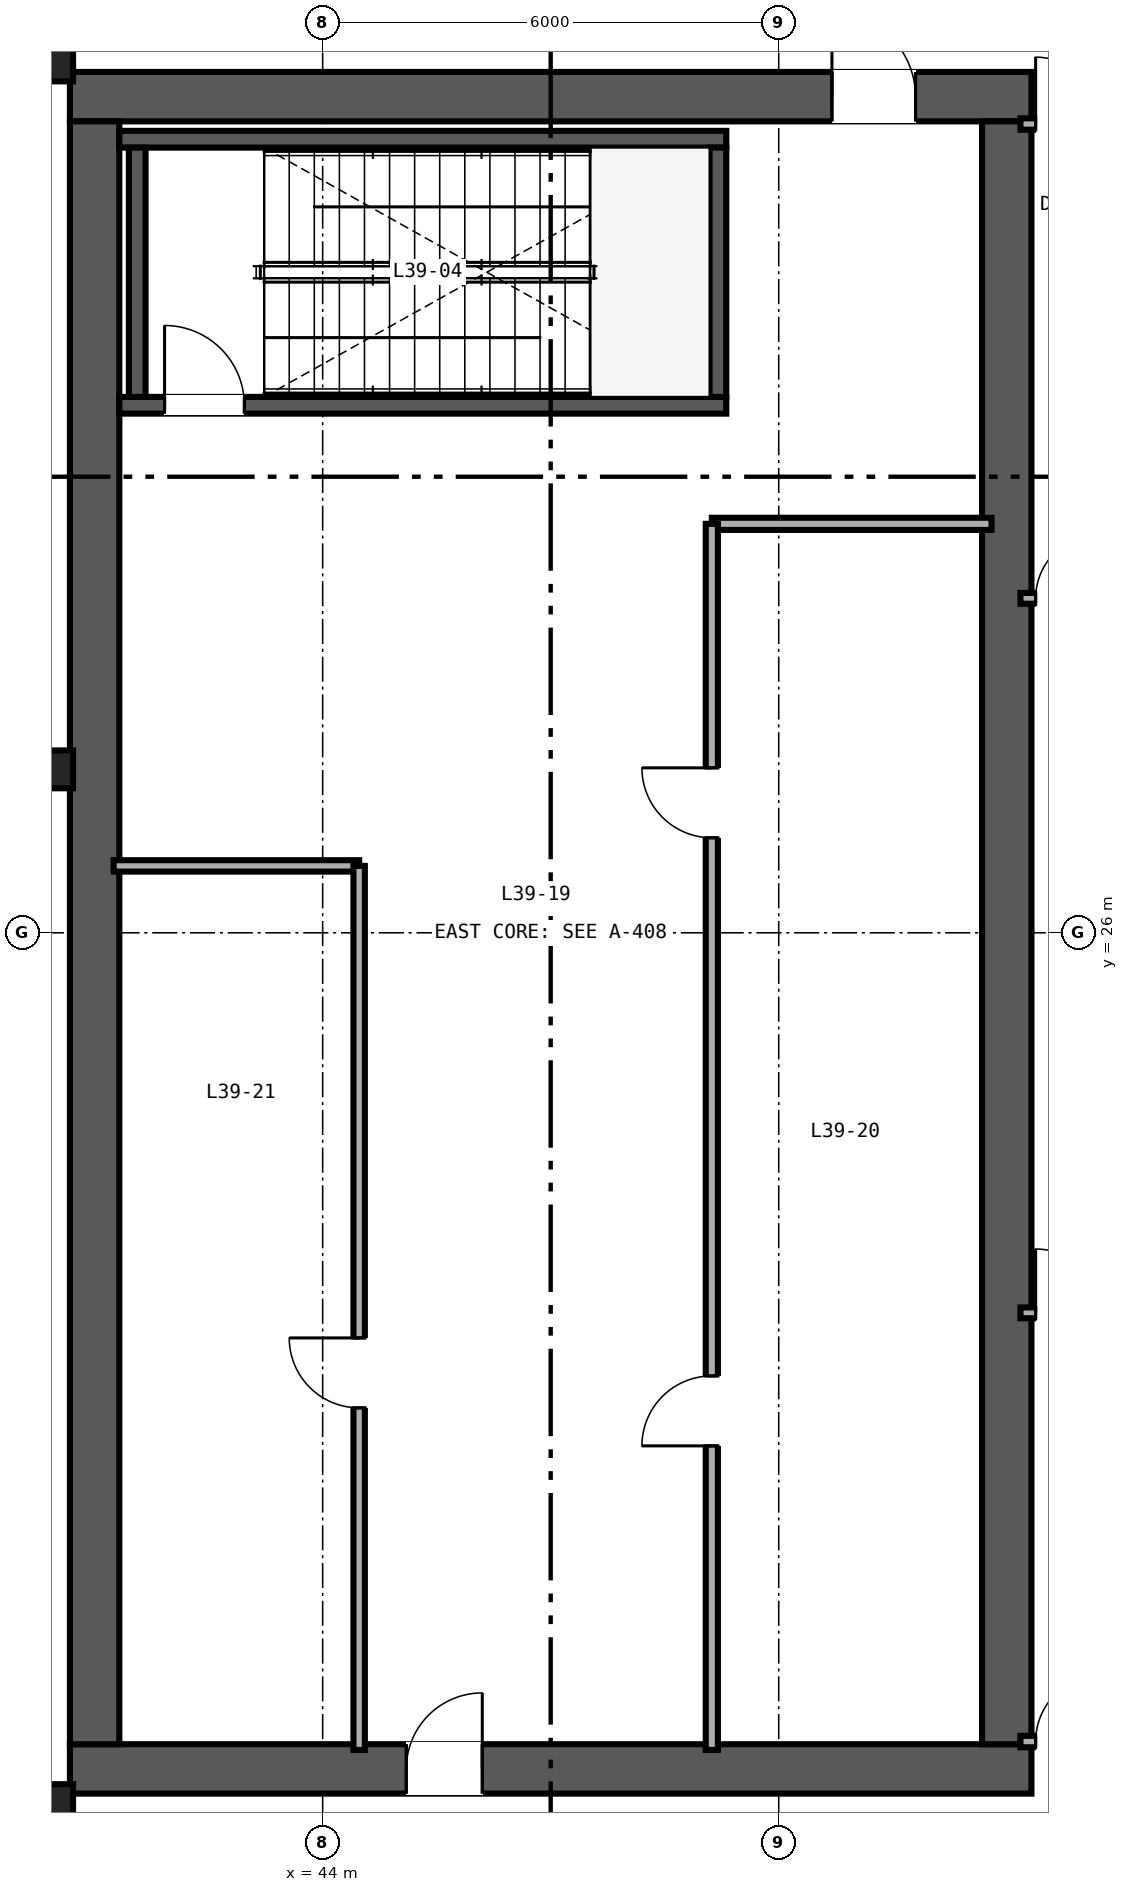
"""IFC4 building model, lengths in metres.
Left out: names, types, materials, properties, quantities, classifications, styles, units other than length and angle.
Written with IfcOpenShell. Run it as: python <this file> out.ifc"""

import sys

from ifc_helpers import new_model, si_unit, direction, frame, frame_2d, origin, origin_2d, place, context, subcontext, project, spatial, rectangle, i_section, extrude, source, transform, mapped, element, fill, save


model = new_model("IFC4")
c1 = context("Model", 3, precision=1e-05, world=origin(), true_north=direction((0.0, 1.0)))
c2 = subcontext(c1, "Body", "Model", "MODEL_VIEW")
j1 = project(units=[si_unit("LENGTHUNIT", "METRE"), si_unit("PLANEANGLEUNIT", "RADIAN")], contexts=[c1])
p1 = place(None, origin())
s1 = spatial("IfcSite", under=j1, at=p1, CompositionType="ELEMENT")
p2 = place(p1, origin())
s2 = spatial("IfcBuilding", under=s1, at=p2, CompositionType="ELEMENT")
p3 = place(p2, frame((0.0, 0.0, 158.4)))
s3 = spatial("IfcBuildingStorey", under=s2, at=p3, CompositionType="ELEMENT", Elevation=158.4)
p4 = place(p3, frame((40.675, 15.0, 0.0), z_axis=(0.0, 0.0, 1.0), x_axis=(1.0, 0.0, 0.0)))
e1 = element("IfcWall", 1, at=p4, inside=s3, PredefinedType="SHEAR", context=c2, shape_type="SweptSolid", body=[
    extrude(rectangle(XDim=12.65, YDim=0.65, at=frame_2d((6.325, 0.0))), origin(), (0.0, 0.0, 1.0), 4.57),
])
p5 = place(p4, frame((4.425, 0.0, 0.0)))
e2 = element("IfcOpeningElement", 2, at=p5, cuts=e1, PredefinedType="OPENING", context=c2, shape_type="SweptSolid", body=[
    extrude(rectangle(XDim=1.0, YDim=2.15, at=frame_2d((0.5, 1.075))), frame((0.0, 0.335, 0.0), z_axis=(0.0, -1.0, 0.0), x_axis=(1.0, 0.0, 0.0)), (0.0, 0.0, 1.0), 0.67),
])
p6 = place(p3, frame((40.675, 37.0, 0.0), z_axis=(0.0, 0.0, 1.0), x_axis=(1.0, 0.0, 0.0)))
e3 = element("IfcWall", 3, at=p6, inside=s3, PredefinedType="SHEAR", context=c2, shape_type="SweptSolid", body=[
    extrude(rectangle(XDim=12.65, YDim=0.65, at=frame_2d((6.325, 0.0))), origin(), (0.0, 0.0, 1.0), 4.57),
])
p7 = place(p6, frame((10.025, 0.0, 0.0)))
e4 = element("IfcOpeningElement", 4, at=p7, cuts=e3, PredefinedType="OPENING", context=c2, shape_type="SweptSolid", body=[
    extrude(rectangle(XDim=1.1, YDim=2.15, at=frame_2d((0.55, 1.075))), frame((0.0, 0.335, 0.0), z_axis=(0.0, -1.0, 0.0), x_axis=(1.0, 0.0, 0.0)), (0.0, 0.0, 1.0), 0.67),
])
for number, where, z_axis, x_axis in (
    (5, (41.0, 15.325, 0.0), (0.0, 0.0, 1.0), (0.0, 1.0, 0.0)),
    (6, (53.0, 15.325, 0.0), (0.0, 0.0, 1.0), (0.0, 1.0, 0.0)),
):
    element("IfcWall", number, at=place(p3, frame(where, z_axis=z_axis, x_axis=x_axis)), inside=s3, PredefinedType="SHEAR", context=c2, shape_type="SweptSolid", body=[
        extrude(rectangle(XDim=21.35, YDim=0.65, at=frame_2d((10.675, 0.0))), origin(), (0.0, 0.0, 1.0), 4.57),
    ])
p8 = place(p3, frame((41.325, 32.94, 0.0), z_axis=(0.0, 0.0, 1.0), x_axis=(1.0, 0.0, 0.0)))
e7 = element("IfcWall", 7, at=p8, inside=s3, PredefinedType="SHEAR", context=c2, shape_type="SweptSolid", body=[
    extrude(rectangle(XDim=7.985, YDim=0.22, at=frame_2d((3.993, 0.0))), origin(), (0.0, 0.0, 1.0), 4.6),
])
p9 = place(p8, frame((0.595, 0.0, 0.0)))
e8 = element("IfcOpeningElement", 8, at=p9, cuts=e7, PredefinedType="OPENING", context=c2, shape_type="SweptSolid", body=[
    extrude(rectangle(XDim=1.05, YDim=2.15, at=frame_2d((0.525, 1.075))), frame((0.0, 0.12, 0.0), z_axis=(0.0, -1.0, 0.0), x_axis=(1.0, 0.0, 0.0)), (0.0, 0.0, 1.0), 0.24),
])
p10 = place(p3, frame((41.325, 36.44, 0.0), z_axis=(0.0, 0.0, 1.0), x_axis=(1.0, 0.0, 0.0)))
e9 = element("IfcWall", 9, at=p10, inside=s3, PredefinedType="SHEAR", context=c2, shape_type="SweptSolid", body=[
    extrude(rectangle(XDim=7.985, YDim=0.22, at=frame_2d((3.993, 0.0))), origin(), (0.0, 0.0, 1.0), 4.6),
])
for number, where, z_axis, x_axis in (
    (10, (41.56, 33.05, 0.0), (0.0, 0.0, 1.0), (0.0, 1.0, 0.0)),
    (11, (49.2, 33.05, 0.0), (0.0, 0.0, 1.0), (0.0, 1.0, 0.0)),
):
    element("IfcWall", number, at=place(p3, frame(where, z_axis=z_axis, x_axis=x_axis)), inside=s3, PredefinedType="SHEAR", context=c2, shape_type="SweptSolid", body=[
        extrude(rectangle(XDim=3.28, YDim=0.22, at=frame_2d((1.64, 0.0))), origin(), (0.0, 0.0, 1.0), 4.6),
    ])
m1 = source(origin(), c2, "Body", "SweptSolid", [
    extrude(i_section(OverallWidth=0.432, OverallDepth=0.498, WebThickness=0.056, FlangeThickness=0.089, FilletRadius=0.025, at=origin_2d()), origin(), (0.0, 0.0, 1.0), 4.57),
])
for number, where, z_axis, x_axis in (
    (12, (40.5, 14.55, 0.0), (0.0, 0.0, 1.0), (1.0, 0.0, 0.0)),
    (13, (40.5, 28.15, 0.0), (0.0, 0.0, 1.0), (1.0, 0.0, 0.0)),
    (14, (40.5, 37.45, 0.0), (0.0, 0.0, 1.0), (1.0, 0.0, 0.0)),
):
    element("IfcColumn", number, at=place(p3, frame(where, z_axis=z_axis, x_axis=x_axis)), inside=s3, PredefinedType="COLUMN", context=c2, shape_type="MappedRepresentation", body=[
        mapped(m1, transform((0.0, 0.0, 0.0), scale=1.0)),
    ])
p11 = place(p3, frame((49.12, 31.38, 0.0), z_axis=(0.0, 0.0, 1.0), x_axis=(1.0, 0.0, 0.0)))
e15 = element("IfcWall", 15, at=p11, inside=s3, PredefinedType="PARTITIONING", context=c2, shape_type="SweptSolid", body=[
    extrude(rectangle(XDim=3.68, YDim=0.16, at=frame_2d((1.84, 0.0))), origin(), (0.0, 0.0, 1.0), 3.47),
])
p12 = place(p3, frame((49.12, 15.25, 0.0), z_axis=(0.0, 0.0, 1.0), x_axis=(0.0, 1.0, 0.0)))
e16 = element("IfcWall", 16, at=p12, inside=s3, PredefinedType="PARTITIONING", context=c2, shape_type="SweptSolid", body=[
    extrude(rectangle(XDim=16.13, YDim=0.16, at=frame_2d((8.065, 0.0))), origin(), (0.0, 0.0, 1.0), 3.47),
])
p13 = place(p12, frame((4.0, 0.0, 0.0)))
e17 = element("IfcOpeningElement", 17, at=p13, cuts=e16, PredefinedType="OPENING", context=c2, shape_type="SweptSolid", body=[
    extrude(rectangle(XDim=0.92, YDim=2.15, at=frame_2d((0.46, 1.075))), frame((0.0, 0.09, 0.0), z_axis=(0.0, -1.0, 0.0), x_axis=(1.0, 0.0, 0.0)), (0.0, 0.0, 1.0), 0.18),
])
p14 = place(p12, frame((12.0, 0.0, 0.0)))
e18 = element("IfcOpeningElement", 18, at=p14, cuts=e16, PredefinedType="OPENING", context=c2, shape_type="SweptSolid", body=[
    extrude(rectangle(XDim=0.92, YDim=2.15, at=frame_2d((0.46, 1.075))), frame((0.0, 0.09, 0.0), z_axis=(0.0, -1.0, 0.0), x_axis=(1.0, 0.0, 0.0)), (0.0, 0.0, 1.0), 0.18),
])
p15 = place(p3, frame((41.25, 26.88, 0.0), z_axis=(0.0, 0.0, 1.0), x_axis=(1.0, 0.0, 0.0)))
e19 = element("IfcWall", 19, at=p15, inside=s3, PredefinedType="PARTITIONING", context=c2, shape_type="SweptSolid", body=[
    extrude(rectangle(XDim=3.23, YDim=0.15, at=frame_2d((1.615, 0.0))), origin(), (0.0, 0.0, 1.0), 4.57),
])
p16 = place(p3, frame((44.48, 15.25, 0.0), z_axis=(0.0, 0.0, 1.0), x_axis=(0.0, 1.0, 0.0)))
e20 = element("IfcWall", 20, at=p16, inside=s3, PredefinedType="PARTITIONING", context=c2, shape_type="SweptSolid", body=[
    extrude(rectangle(XDim=11.63, YDim=0.15, at=frame_2d((5.815, 0.0))), origin(), (0.0, 0.0, 1.0), 4.57),
])
p17 = place(p16, frame((4.5, 0.0, 0.0)))
e21 = element("IfcOpeningElement", 21, at=p17, cuts=e20, PredefinedType="OPENING", context=c2, shape_type="SweptSolid", body=[
    extrude(rectangle(XDim=0.92, YDim=2.15, at=frame_2d((0.46, 1.075))), frame((0.0, 0.085, 0.0), z_axis=(0.0, -1.0, 0.0), x_axis=(1.0, 0.0, 0.0)), (0.0, 0.0, 1.0), 0.17),
])
p18 = place(p3, frame((53.18, 15.36, 0.0), z_axis=(0.0, 0.0, 1.0), x_axis=(1.0, 0.0, 0.0)))
e22 = element("IfcWall", 22, at=p18, inside=s3, PredefinedType="PARTITIONING", context=c2, shape_type="SweptSolid", body=[
    extrude(rectangle(XDim=2.66, YDim=0.15, at=frame_2d((1.33, 0.0))), origin(), (0.0, 0.0, 1.0), 3.791),
])
p19 = place(p18, frame((0.2, 0.0, 0.0)))
e23 = element("IfcOpeningElement", 23, at=p19, cuts=e22, PredefinedType="OPENING", context=c2, shape_type="SweptSolid", body=[
    extrude(rectangle(XDim=0.88, YDim=2.15, at=frame_2d((0.44, 1.075))), frame((0.0, 0.085, 0.0), z_axis=(0.0, -1.0, 0.0), x_axis=(1.0, 0.0, 0.0)), (0.0, 0.0, 1.0), 0.17),
])
p20 = place(p3, frame((53.18, 36.64, 0.0), z_axis=(0.0, 0.0, 1.0), x_axis=(1.0, 0.0, 0.0)))
e24 = element("IfcWall", 24, at=p20, inside=s3, PredefinedType="PARTITIONING", context=c2, shape_type="SweptSolid", body=[
    extrude(rectangle(XDim=2.66, YDim=0.15, at=frame_2d((1.33, 0.0))), origin(), (0.0, 0.0, 1.0), 3.953),
])
p21 = place(p20, frame((0.2, 0.0, 0.0)))
e25 = element("IfcOpeningElement", 25, at=p21, cuts=e24, PredefinedType="OPENING", context=c2, shape_type="SweptSolid", body=[
    extrude(rectangle(XDim=0.88, YDim=2.15, at=frame_2d((0.44, 1.075))), frame((0.0, 0.085, 0.0), z_axis=(0.0, -1.0, 0.0), x_axis=(1.0, 0.0, 0.0)), (0.0, 0.0, 1.0), 0.17),
])
p22 = place(p3, frame((53.18, 21.0, 0.0), z_axis=(0.0, 0.0, 1.0), x_axis=(1.0, 0.0, 0.0)))
e26 = element("IfcWall", 26, at=p22, inside=s3, PredefinedType="PARTITIONING", context=c2, shape_type="SweptSolid", body=[
    extrude(rectangle(XDim=2.66, YDim=0.142, at=frame_2d((1.33, 0.0))), origin(), (0.0, 0.0, 1.0), 3.791),
])
p23 = place(p22, frame((0.2, 0.0, 0.0)))
e27 = element("IfcOpeningElement", 27, at=p23, cuts=e26, PredefinedType="OPENING", context=c2, shape_type="SweptSolid", body=[
    extrude(rectangle(XDim=0.84, YDim=2.1, at=frame_2d((0.42, 1.05))), frame((0.0, 0.081, 0.0), z_axis=(0.0, -1.0, 0.0), x_axis=(1.0, 0.0, 0.0)), (0.0, 0.0, 1.0), 0.162),
])
p24 = place(p3, frame((53.18, 30.4, 0.0), z_axis=(0.0, 0.0, 1.0), x_axis=(1.0, 0.0, 0.0)))
e28 = element("IfcWall", 28, at=p24, inside=s3, PredefinedType="PARTITIONING", context=c2, shape_type="SweptSolid", body=[
    extrude(rectangle(XDim=2.66, YDim=0.142, at=frame_2d((1.33, 0.0))), origin(), (0.0, 0.0, 1.0), 3.953),
])
p25 = place(p24, frame((0.2, 0.0, 0.0)))
e29 = element("IfcOpeningElement", 29, at=p25, cuts=e28, PredefinedType="OPENING", context=c2, shape_type="SweptSolid", body=[
    extrude(rectangle(XDim=0.84, YDim=2.1, at=frame_2d((0.42, 1.05))), frame((0.0, 0.081, 0.0), z_axis=(0.0, -1.0, 0.0), x_axis=(1.0, 0.0, 0.0)), (0.0, 0.0, 1.0), 0.162),
])
m2 = source(origin(), c2, "Body", "SweptSolid", [
    extrude(rectangle(XDim=1.05, YDim=2.15, at=frame_2d((0.525, 1.075))), frame((0.0, 0.025, 0.0), z_axis=(0.0, -1.0, 0.0), x_axis=(1.0, 0.0, 0.0)), (0.0, 0.0, 1.0), 0.05),
])
p26 = place(p9, origin())
e30 = element("IfcDoor", 30, at=p26, inside=s3, OperationType="SINGLE_SWING_LEFT", PredefinedType="DOOR", context=c2, shape_type="MappedRepresentation", body=[
    mapped(m2, transform((0.0, 0.0, 0.0), scale=1.0)),
])
fill(e8, e30)
m3 = source(origin(), c2, "Body", "SweptSolid", [
    extrude(rectangle(XDim=1.0, YDim=2.15, at=frame_2d((0.5, 1.075))), frame((0.0, 0.025, 0.0), z_axis=(0.0, -1.0, 0.0), x_axis=(1.0, 0.0, 0.0)), (0.0, 0.0, 1.0), 0.05),
])
p27 = place(p5, origin())
e31 = element("IfcDoor", 31, at=p27, inside=s3, OperationType="SINGLE_SWING_RIGHT", PredefinedType="DOOR", context=c2, shape_type="MappedRepresentation", body=[
    mapped(m3, transform((0.0, 0.0, 0.0), scale=1.0)),
])
fill(e2, e31)
m4 = source(origin(), c2, "Body", "SweptSolid", [
    extrude(rectangle(XDim=1.1, YDim=2.15, at=frame_2d((0.55, 1.075))), frame((0.0, 0.025, 0.0), z_axis=(0.0, -1.0, 0.0), x_axis=(1.0, 0.0, 0.0)), (0.0, 0.0, 1.0), 0.05),
])
p28 = place(p7, origin())
e32 = element("IfcDoor", 32, at=p28, inside=s3, OperationType="SINGLE_SWING_LEFT", PredefinedType="DOOR", context=c2, shape_type="MappedRepresentation", body=[
    mapped(m4, transform((0.0, 0.0, 0.0), scale=1.0)),
])
fill(e4, e32)
m5 = source(origin(), c2, "Body", "SweptSolid", [
    extrude(rectangle(XDim=0.92, YDim=2.15, at=frame_2d((0.46, 1.075))), frame((0.0, 0.025, 0.0), z_axis=(0.0, -1.0, 0.0), x_axis=(1.0, 0.0, 0.0)), (0.0, 0.0, 1.0), 0.05),
])
p29 = place(p13, origin())
e33 = element("IfcDoor", 33, at=p29, inside=s3, OperationType="SINGLE_SWING_LEFT", PredefinedType="DOOR", context=c2, shape_type="MappedRepresentation", body=[
    mapped(m5, transform((0.0, 0.0, 0.0), scale=1.0)),
])
fill(e17, e33)
p30 = place(p14, origin())
e34 = element("IfcDoor", 34, at=p30, inside=s3, OperationType="SINGLE_SWING_RIGHT", PredefinedType="DOOR", context=c2, shape_type="MappedRepresentation", body=[
    mapped(m5, transform((0.0, 0.0, 0.0), scale=1.0)),
])
fill(e18, e34)
p31 = place(p17, origin())
e35 = element("IfcDoor", 35, at=p31, inside=s3, OperationType="SINGLE_SWING_RIGHT", PredefinedType="DOOR", context=c2, shape_type="MappedRepresentation", body=[
    mapped(m5, transform((0.0, 0.0, 0.0), scale=1.0)),
])
fill(e21, e35)
m6 = source(origin(), c2, "Body", "SweptSolid", [
    extrude(rectangle(XDim=0.88, YDim=2.15, at=frame_2d((0.44, 1.075))), frame((0.0, 0.025, 0.0), z_axis=(0.0, -1.0, 0.0), x_axis=(1.0, 0.0, 0.0)), (0.0, 0.0, 1.0), 0.05),
])
p32 = place(p19, origin())
e36 = element("IfcDoor", 36, at=p32, inside=s3, OperationType="SINGLE_SWING_RIGHT", PredefinedType="DOOR", context=c2, shape_type="MappedRepresentation", body=[
    mapped(m6, transform((0.0, 0.0, 0.0), scale=1.0)),
])
fill(e23, e36)
p33 = place(p21, origin())
e37 = element("IfcDoor", 37, at=p33, inside=s3, OperationType="SINGLE_SWING_LEFT", PredefinedType="DOOR", context=c2, shape_type="MappedRepresentation", body=[
    mapped(m6, transform((0.0, 0.0, 0.0), scale=1.0)),
])
fill(e25, e37)
m7 = source(origin(), c2, "Body", "SweptSolid", [
    extrude(rectangle(XDim=0.84, YDim=2.1, at=frame_2d((0.42, 1.05))), frame((0.0, 0.025, 0.0), z_axis=(0.0, -1.0, 0.0), x_axis=(1.0, 0.0, 0.0)), (0.0, 0.0, 1.0), 0.05),
])
p34 = place(p23, origin())
e38 = element("IfcDoor", 38, at=p34, inside=s3, OperationType="SINGLE_SWING_LEFT", PredefinedType="DOOR", context=c2, shape_type="MappedRepresentation", body=[
    mapped(m7, transform((0.0, 0.0, 0.0), scale=1.0)),
])
fill(e27, e38)
p35 = place(p25, origin())
e39 = element("IfcDoor", 39, at=p35, inside=s3, OperationType="SINGLE_SWING_RIGHT", PredefinedType="DOOR", context=c2, shape_type="MappedRepresentation", body=[
    mapped(m7, transform((0.0, 0.0, 0.0), scale=1.0)),
])
fill(e29, e39)
save(model, sys.argv[1])
